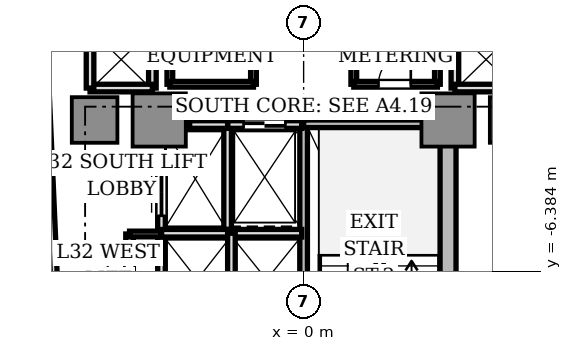
"""IFC4 building model, lengths in metres.
Left out: names, types, materials, properties, quantities, classifications, styles, units other than length and angle.
Written with IfcOpenShell. Run it as: python <this file> out.ifc"""

import sys

from ifc_helpers import new_model, si_unit, direction, frame, frame_2d, origin, origin_2d, place, context, subcontext, project, spatial, rectangle, extrude, source, transform, mapped, element, fill, save


model = new_model("IFC4")
c1 = context("Model", 3, precision=1e-05, world=origin(), true_north=direction((0.0, 1.0)))
c2 = subcontext(c1, "Body", "Model", "MODEL_VIEW")
j1 = project(units=[si_unit("LENGTHUNIT", "METRE"), si_unit("PLANEANGLEUNIT", "RADIAN")], contexts=[c1])
p1 = place(None, origin())
s1 = spatial("IfcSite", under=j1, at=p1, CompositionType="ELEMENT")
p2 = place(p1, origin())
s2 = spatial("IfcBuilding", under=s1, at=p2, CompositionType="ELEMENT")
p3 = place(p2, frame((0.0, 0.0, 118.15)))
s3 = spatial("IfcBuildingStorey", under=s2, at=p3, CompositionType="ELEMENT", Elevation=118.15)
p4 = place(p3, frame((3.8, -9.75, 0.0), z_axis=(0.0, 0.0, 1.0), x_axis=(0.0, 1.0, 0.0)))
e1 = element("IfcWall", 1, at=p4, inside=s3, PredefinedType="SHEAR", context=c2, shape_type="SweptSolid", body=[
    extrude(rectangle(XDim=6.9, YDim=0.42, at=frame_2d((3.45, 0.0))), origin(), (0.0, 0.0, 1.0), 3.11),
])
m1 = source(origin(), c2, "Body", "SweptSolid", [
    extrude(rectangle(XDim=1.4, YDim=1.4, at=origin_2d()), origin(), (0.0, 0.0, 1.0), 3.11),
])
for number, where, z_axis, x_axis in (
    (2, (-3.8, -2.4, 0.0), (0.0, 0.0, 1.0), (1.0, 0.0, 0.0)),
    (3, (3.8, -2.4, 0.0), (0.0, 0.0, 1.0), (1.0, 0.0, 0.0)),
):
    element("IfcColumn", number, at=place(p3, frame(where, z_axis=z_axis, x_axis=x_axis)), inside=s3, PredefinedType="COLUMN", context=c2, shape_type="MappedRepresentation", body=[
        mapped(m1, transform((0.0, 0.0, 0.0), scale=1.0)),
    ])
m2 = source(origin(), c2, "Body", "SweptSolid", [
    extrude(rectangle(XDim=1.2, YDim=1.2, at=origin_2d()), origin(), (0.0, 0.0, 1.0), 3.11),
])
for number, where, z_axis, x_axis in (
    (4, (5.5, -2.4, 0.0), (0.0, 0.0, 1.0), (1.0, 0.0, 0.0)),
    (5, (-5.5, -2.4, 0.0), (0.0, 0.0, 1.0), (1.0, 0.0, 0.0)),
):
    element("IfcColumn", number, at=place(p3, frame(where, z_axis=z_axis, x_axis=x_axis)), inside=s3, PredefinedType="COLUMN", context=c2, shape_type="MappedRepresentation", body=[
        mapped(m2, transform((0.0, 0.0, 0.0), scale=1.0)),
    ])
p5 = place(p3, frame((0.0, -10.18, 0.0), z_axis=(0.0, 0.0, 1.0), x_axis=(0.0, 1.0, 0.0)))
e6 = element("IfcWall", 6, at=p5, inside=s3, PredefinedType="SOLIDWALL", context=c2, shape_type="SweptSolid", body=[
    extrude(rectangle(XDim=7.68, YDim=0.2, at=frame_2d((3.84, 0.0))), origin(), (0.0, 0.0, 1.0), 3.11),
])
p6 = place(p5, frame((0.28, 0.0, 0.0)))
e7 = element("IfcOpeningElement", 7, at=p6, cuts=e6, PredefinedType="OPENING", context=c2, shape_type="SweptSolid", body=[
    extrude(rectangle(XDim=1.1, YDim=2.15, at=frame_2d((0.55, 1.075))), frame((0.0, 0.11, 0.0), z_axis=(0.0, -1.0, 0.0), x_axis=(1.0, 0.0, 0.0)), (0.0, 0.0, 1.0), 0.22),
])
p7 = place(p3, frame((0.0, -2.5, 0.0), z_axis=(0.0, 0.0, 1.0), x_axis=(1.0, 0.0, 0.0)))
e8 = element("IfcWall", 8, at=p7, inside=s3, PredefinedType="SOLIDWALL", context=c2, shape_type="SweptSolid", body=[
    extrude(rectangle(XDim=3.72, YDim=0.2, at=frame_2d((1.86, 0.0))), origin(), (0.0, 0.0, 1.0), 3.11),
])
p8 = place(p3, frame((-2.0, -5.28, 0.0), z_axis=(0.0, 0.0, 1.0), x_axis=(0.0, 1.0, 0.0)))
e9 = element("IfcWall", 9, at=p8, inside=s3, PredefinedType="SOLIDWALL", context=c2, shape_type="SweptSolid", body=[
    extrude(rectangle(XDim=2.78, YDim=0.2, at=frame_2d((1.39, 0.0))), origin(), (0.0, 0.0, 1.0), 2.66),
])
p9 = place(p3, frame((-2.0, -2.52, 0.0), z_axis=(0.0, 0.0, 1.0), x_axis=(1.0, 0.0, 0.0)))
e10 = element("IfcWall", 10, at=p9, inside=s3, PredefinedType="SOLIDWALL", context=c2, shape_type="SweptSolid", body=[
    extrude(rectangle(XDim=1.95, YDim=0.2, at=frame_2d((0.975, 0.0))), origin(), (0.0, 0.0, 1.0), 2.66),
])
p10 = place(p9, frame((0.42, 0.0, 0.0)))
e11 = element("IfcOpeningElement", 11, at=p10, cuts=e10, PredefinedType="OPENING", context=c2, shape_type="SweptSolid", body=[
    extrude(rectangle(XDim=1.1, YDim=2.2, at=frame_2d((0.55, 1.1))), frame((0.0, 0.11, 0.0), z_axis=(0.0, -1.0, 0.0), x_axis=(1.0, 0.0, 0.0)), (0.0, 0.0, 1.0), 0.22),
])
p11 = place(p3, frame((-3.0, -2.52, 0.0), z_axis=(0.0, 0.0, 1.0), x_axis=(1.0, 0.0, 0.0)))
e12 = element("IfcWall", 12, at=p11, inside=s3, PredefinedType="SOLIDWALL", context=c2, shape_type="SweptSolid", body=[
    extrude(rectangle(XDim=1.0, YDim=0.2, at=frame_2d((0.5, 0.0))), origin(), (0.0, 0.0, 1.0), 2.66),
])
p12 = place(p3, frame((-3.74, -5.36, 0.0), z_axis=(0.0, 0.0, 1.0), x_axis=(0.0, 1.0, 0.0)))
e13 = element("IfcWall", 13, at=p12, inside=s3, PredefinedType="SOLIDWALL", context=c2, shape_type="SweptSolid", body=[
    extrude(rectangle(XDim=2.08, YDim=0.2, at=frame_2d((1.04, 0.0))), origin(), (0.0, 0.0, 1.0), 2.66),
])
p13 = place(p12, frame((0.44, 0.0, 0.0)))
e14 = element("IfcOpeningElement", 14, at=p13, cuts=e13, PredefinedType="OPENING", context=c2, shape_type="SweptSolid", body=[
    extrude(rectangle(XDim=1.2, YDim=2.2, at=frame_2d((0.6, 1.1))), frame((0.0, 0.11, 0.0), z_axis=(0.0, -1.0, 0.0), x_axis=(1.0, 0.0, 0.0)), (0.0, 0.0, 1.0), 0.22),
])
p14 = place(p3, frame((-3.74, -7.86, 0.0), z_axis=(0.0, 0.0, 1.0), x_axis=(0.0, 1.0, 0.0)))
e15 = element("IfcWall", 15, at=p14, inside=s3, PredefinedType="SOLIDWALL", context=c2, shape_type="SweptSolid", body=[
    extrude(rectangle(XDim=2.48, YDim=0.2, at=frame_2d((1.24, 0.0))), origin(), (0.0, 0.0, 1.0), 2.66),
])
p15 = place(p3, frame((-3.74, -5.38, 0.0), z_axis=(0.0, 0.0, 1.0), x_axis=(1.0, 0.0, 0.0)))
e16 = element("IfcWall", 16, at=p15, inside=s3, PredefinedType="SOLIDWALL", context=c2, shape_type="SweptSolid", body=[
    extrude(rectangle(XDim=3.69, YDim=0.2, at=frame_2d((1.845, 0.0))), origin(), (0.0, 0.0, 1.0), 2.66),
])
p16 = place(p3, frame((-1.9, -7.86, 0.0), z_axis=(0.0, 0.0, 1.0), x_axis=(0.0, 1.0, 0.0)))
e17 = element("IfcWall", 17, at=p16, inside=s3, PredefinedType="SOLIDWALL", context=c2, shape_type="SweptSolid", body=[
    extrude(rectangle(XDim=2.48, YDim=0.2, at=frame_2d((1.24, 0.0))), origin(), (0.0, 0.0, 1.0), 2.66),
])
p17 = place(p3, frame((3.98, -1.56, 0.0), z_axis=(0.0, 0.0, 1.0), x_axis=(0.0, 1.0, 0.0)))
e18 = element("IfcWall", 18, at=p17, inside=s3, PredefinedType="SOLIDWALL", context=c2, shape_type="SweptSolid", body=[
    extrude(rectangle(XDim=3.12, YDim=0.2, at=frame_2d((1.56, 0.0))), origin(), (0.0, 0.0, 1.0), 2.28),
])
p18 = place(p3, frame((3.98, -1.56, 0.0), z_axis=(0.0, 0.0, 1.0), x_axis=(1.0, 0.0, 0.0)))
e19 = element("IfcWall", 19, at=p18, inside=s3, PredefinedType="SOLIDWALL", context=c2, shape_type="SweptSolid", body=[
    extrude(rectangle(XDim=1.64, YDim=0.2, at=frame_2d((0.82, 0.0))), origin(), (0.0, 0.0, 1.0), 2.66),
])
p19 = place(p3, frame((-3.98, -1.56, 0.0), z_axis=(0.0, 0.0, 1.0), x_axis=(0.0, 1.0, 0.0)))
e20 = element("IfcWall", 20, at=p19, inside=s3, PredefinedType="SOLIDWALL", context=c2, shape_type="SweptSolid", body=[
    extrude(rectangle(XDim=3.12, YDim=0.2, at=frame_2d((1.56, 0.0))), origin(), (0.0, 0.0, 1.0), 2.28),
])
p20 = place(p3, frame((-5.62, -1.56, 0.0), z_axis=(0.0, 0.0, 1.0), x_axis=(1.0, 0.0, 0.0)))
e21 = element("IfcWall", 21, at=p20, inside=s3, PredefinedType="SOLIDWALL", context=c2, shape_type="SweptSolid", body=[
    extrude(rectangle(XDim=1.64, YDim=0.2, at=frame_2d((0.82, 0.0))), origin(), (0.0, 0.0, 1.0), 2.66),
])
p21 = place(p3, frame((-5.62, -1.56, 0.0), z_axis=(0.0, 0.0, 1.0), x_axis=(0.0, 1.0, 0.0)))
e22 = element("IfcWall", 22, at=p21, inside=s3, PredefinedType="SOLIDWALL", context=c2, shape_type="SweptSolid", body=[
    extrude(rectangle(XDim=1.56, YDim=0.2, at=frame_2d((0.78, 0.0))), origin(), (0.0, 0.0, 1.0), 2.66),
])
p22 = place(p3, frame((-4.58, -7.86, 0.0), z_axis=(0.0, 0.0, 1.0), x_axis=(0.0, 1.0, 0.0)))
e23 = element("IfcWall", 23, at=p22, inside=s3, PredefinedType="SOLIDWALL", context=c2, shape_type="SweptSolid", body=[
    extrude(rectangle(XDim=2.46, YDim=0.2, at=frame_2d((1.23, 0.0))), origin(), (0.0, 0.0, 1.0), 2.66),
])
p23 = place(p22, frame((0.2, 0.0, 0.0)))
e24 = element("IfcOpeningElement", 24, at=p23, cuts=e23, PredefinedType="OPENING", context=c2, shape_type="SweptSolid", body=[
    extrude(rectangle(XDim=0.85, YDim=2.1, at=frame_2d((0.425, 1.05))), frame((0.0, 0.11, 0.0), z_axis=(0.0, -1.0, 0.0), x_axis=(1.0, 0.0, 0.0)), (0.0, 0.0, 1.0), 0.22),
])
p24 = place(p22, frame((1.38, 0.0, 0.0)))
e25 = element("IfcOpeningElement", 25, at=p24, cuts=e23, PredefinedType="OPENING", context=c2, shape_type="SweptSolid", body=[
    extrude(rectangle(XDim=0.85, YDim=2.1, at=frame_2d((0.425, 1.05))), frame((0.0, 0.11, 0.0), z_axis=(0.0, -1.0, 0.0), x_axis=(1.0, 0.0, 0.0)), (0.0, 0.0, 1.0), 0.22),
])
p25 = place(p3, frame((-4.58, -5.4, 0.0), z_axis=(0.0, 0.0, 1.0), x_axis=(1.0, 0.0, 0.0)))
e26 = element("IfcWall", 26, at=p25, inside=s3, PredefinedType="PARTITIONING", context=c2, shape_type="SweptSolid", body=[
    extrude(rectangle(XDim=0.84, YDim=0.15, at=frame_2d((0.42, 0.0))), origin(), (0.0, 0.0, 1.0), 2.66),
])
p26 = place(p3, frame((-1.32, -1.46, 0.0), z_axis=(0.0, 0.0, 1.0), x_axis=(0.0, 1.0, 0.0)))
e27 = element("IfcWall", 27, at=p26, inside=s3, PredefinedType="PARTITIONING", context=c2, shape_type="SweptSolid", body=[
    extrude(rectangle(XDim=2.92, YDim=0.15, at=frame_2d((1.46, 0.0))), origin(), (0.0, 0.0, 1.0), 2.66),
])
p27 = place(p3, frame((-3.52, -1.46, 0.0), z_axis=(0.0, 0.0, 1.0), x_axis=(0.0, 1.0, 0.0)))
e28 = element("IfcWall", 28, at=p27, inside=s3, PredefinedType="PARTITIONING", context=c2, shape_type="SweptSolid", body=[
    extrude(rectangle(XDim=2.92, YDim=0.15, at=frame_2d((1.46, 0.0))), origin(), (0.0, 0.0, 1.0), 2.28),
])
p28 = place(p3, frame((-3.52, -1.46, 0.0), z_axis=(0.0, 0.0, 1.0), x_axis=(1.0, 0.0, 0.0)))
e29 = element("IfcWall", 29, at=p28, inside=s3, PredefinedType="PARTITIONING", context=c2, shape_type="SweptSolid", body=[
    extrude(rectangle(XDim=2.2, YDim=0.15, at=frame_2d((1.1, 0.0))), origin(), (0.0, 0.0, 1.0), 2.66),
])
p29 = place(p3, frame((1.32, -1.46, 0.0), z_axis=(0.0, 0.0, 1.0), x_axis=(0.0, 1.0, 0.0)))
e30 = element("IfcWall", 30, at=p29, inside=s3, PredefinedType="PARTITIONING", context=c2, shape_type="SweptSolid", body=[
    extrude(rectangle(XDim=2.92, YDim=0.15, at=frame_2d((1.46, 0.0))), origin(), (0.0, 0.0, 1.0), 2.66),
])
p30 = place(p3, frame((3.52, -1.46, 0.0), z_axis=(0.0, 0.0, 1.0), x_axis=(0.0, 1.0, 0.0)))
e31 = element("IfcWall", 31, at=p30, inside=s3, PredefinedType="PARTITIONING", context=c2, shape_type="SweptSolid", body=[
    extrude(rectangle(XDim=2.92, YDim=0.15, at=frame_2d((1.46, 0.0))), origin(), (0.0, 0.0, 1.0), 2.28),
])
p31 = place(p3, frame((1.32, -1.46, 0.0), z_axis=(0.0, 0.0, 1.0), x_axis=(1.0, 0.0, 0.0)))
e32 = element("IfcWall", 32, at=p31, inside=s3, PredefinedType="PARTITIONING", context=c2, shape_type="SweptSolid", body=[
    extrude(rectangle(XDim=2.2, YDim=0.15, at=frame_2d((1.1, 0.0))), origin(), (0.0, 0.0, 1.0), 2.66),
])
p32 = place(p31, frame((0.65, 0.0, 0.0)))
e33 = element("IfcOpeningElement", 33, at=p32, cuts=e32, PredefinedType="OPENING", context=c2, shape_type="SweptSolid", body=[
    extrude(rectangle(XDim=0.85, YDim=2.1, at=frame_2d((0.425, 1.05))), frame((0.0, 0.085, 0.0), z_axis=(0.0, -1.0, 0.0), x_axis=(1.0, 0.0, 0.0)), (0.0, 0.0, 1.0), 0.17),
])
p33 = place(p3, frame((-6.8, -1.298, 0.0), z_axis=(0.0, 0.0, 1.0), x_axis=(0.04359376056, -0.999049340143, 0.0)))
e34 = element("IfcWall", 34, at=p33, inside=s3, PredefinedType="PARTITIONING", context=c2, shape_type="SweptSolid", body=[
    extrude(rectangle(XDim=5.55, YDim=0.18, at=frame_2d((2.775, 0.0))), origin(), (0.0, 0.0, 1.0), 2.66),
])
m3 = source(origin(), c2, "Body", "SweptSolid", [
    extrude(rectangle(XDim=1.1, YDim=0.05, at=origin_2d()), origin(), (0.0, 0.0, 1.0), 2.2),
])
p34 = place(p10, frame((0.55, 0.0, 0.0)))
e35 = element("IfcDoor", 35, at=p34, inside=s3, OperationType="DOUBLE_DOOR_SLIDING", PredefinedType="DOOR", context=c2, shape_type="MappedRepresentation", body=[
    mapped(m3, transform((0.0, 0.0, 0.0), scale=1.0)),
])
fill(e11, e35)
m4 = source(origin(), c2, "Body", "SweptSolid", [
    extrude(rectangle(XDim=1.2, YDim=0.05, at=origin_2d()), origin(), (0.0, 0.0, 1.0), 2.2),
])
p35 = place(p13, frame((0.6, 0.0, 0.0)))
e36 = element("IfcDoor", 36, at=p35, inside=s3, OperationType="DOUBLE_DOOR_SLIDING", PredefinedType="DOOR", context=c2, shape_type="MappedRepresentation", body=[
    mapped(m4, transform((0.0, 0.0, 0.0), scale=1.0)),
])
fill(e14, e36)
m5 = source(origin(), c2, "Body", "SweptSolid", [
    extrude(rectangle(XDim=0.85, YDim=0.05, at=origin_2d()), origin(), (0.0, 0.0, 1.0), 2.1),
])
p36 = place(p24, frame((0.425, 0.0, 0.0)))
e37 = element("IfcDoor", 37, at=p36, inside=s3, OperationType="SINGLE_SWING_RIGHT", PredefinedType="DOOR", context=c2, shape_type="MappedRepresentation", body=[
    mapped(m5, transform((0.0, 0.0, 0.0), scale=1.0)),
])
fill(e25, e37)
p37 = place(p32, frame((0.425, 0.0, 0.0)))
e38 = element("IfcDoor", 38, at=p37, inside=s3, OperationType="SINGLE_SWING_RIGHT", PredefinedType="DOOR", context=c2, shape_type="MappedRepresentation", body=[
    mapped(m5, transform((0.0, 0.0, 0.0), scale=1.0)),
])
fill(e33, e38)
save(model, sys.argv[1])
